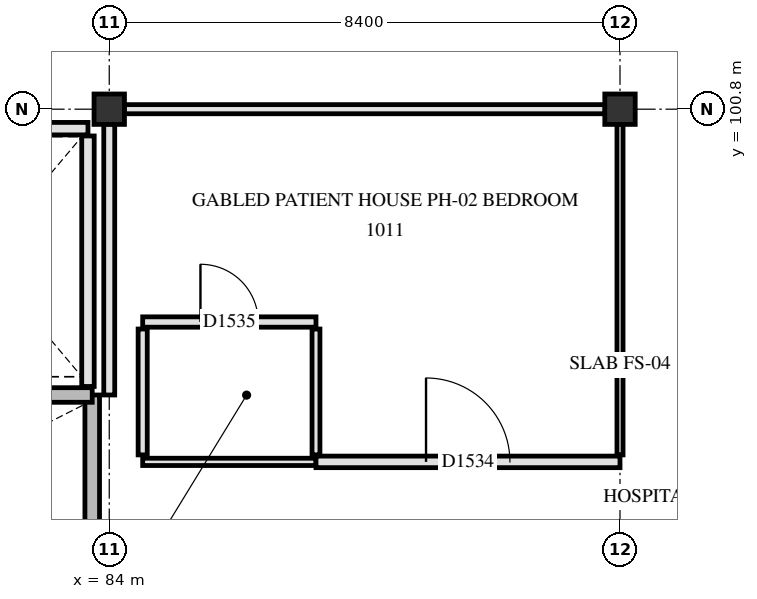
"""IFC4 building model, lengths in metres.
Left out: names, types, materials, properties, quantities, classifications, styles, units other than length and angle.
Written with IfcOpenShell. Run it as: python <this file> out.ifc"""

import sys

from ifc_helpers import new_model, si_unit, direction, frame, frame_2d, origin, origin_2d, place, context, subcontext, project, spatial, rectangle, extrude, element, fill, save


model = new_model("IFC4")
c1 = context("Model", 3, precision=1e-05, world=origin(), true_north=direction((0.0, 1.0)))
c2 = subcontext(c1, "Body", "Model", "MODEL_VIEW")
j1 = project(units=[si_unit("LENGTHUNIT", "METRE"), si_unit("PLANEANGLEUNIT", "RADIAN")], contexts=[c1])
p1 = place(None, origin())
s1 = spatial("IfcSite", under=j1, at=p1, CompositionType="ELEMENT")
p2 = place(p1, origin())
s2 = spatial("IfcBuilding", under=s1, at=p2, CompositionType="ELEMENT")
p3 = place(p2, frame((0.0, 0.0, 30.3)))
s3 = spatial("IfcBuildingStorey", under=s2, at=p3, CompositionType="ELEMENT", Elevation=30.3)
for number, where, z_axis, x_axis in (
    (1, (84.0, 100.8, 0.0), (0.0, 0.0, 1.0), (1.0, 0.0, 0.0)),
    (2, (92.4, 100.8, 0.0), (0.0, 0.0, 1.0), (1.0, 0.0, 0.0)),
):
    element("IfcColumn", number, at=place(p3, frame(where, z_axis=z_axis, x_axis=x_axis)), inside=s3, PredefinedType="COLUMN", context=c2, shape_type="SweptSolid", body=[
        extrude(rectangle(XDim=0.5, YDim=0.5, at=origin_2d()), origin(), (0.0, 0.0, 1.0), 3.9),
    ])
p4 = place(p3, frame((83.72, 92.78, 0.0), z_axis=(0.0, 0.0, 1.0), x_axis=(0.0, 1.0, 0.0)))
e3 = element("IfcWall", 3, at=p4, inside=s3, PredefinedType="SHEAR", context=c2, shape_type="SweptSolid", body=[
    extrude(rectangle(XDim=3.32, YDim=0.24, at=frame_2d((1.66, 0.0))), origin(), (0.0, 0.0, 1.0), 3.66),
])
p5 = place(p3, frame((75.9, 96.1, 0.0), z_axis=(0.0, 0.0, 1.0), x_axis=(1.0, 0.0, 0.0)))
e4 = element("IfcWall", 4, at=p5, inside=s3, PredefinedType="SHEAR", context=c2, shape_type="SweptSolid", body=[
    extrude(rectangle(XDim=7.82, YDim=0.24, at=frame_2d((3.91, 0.0))), origin(), (0.0, 0.0, 1.0), 3.66),
])
p6 = place(p5, frame((0.25, 0.0, 0.0)))
e5 = element("IfcOpeningElement", 5, at=p6, cuts=e4, PredefinedType="OPENING", context=c2, shape_type="SweptSolid", body=[
    extrude(rectangle(XDim=1.45, YDim=2.2, at=frame_2d((0.725, 1.1))), frame((0.0, 0.13, 0.0), z_axis=(0.0, -1.0, 0.0), x_axis=(1.0, 0.0, 0.0)), (0.0, 0.0, 1.0), 0.26),
])
p7 = place(p3, frame((83.65, 96.24, 0.0), z_axis=(0.0, 0.0, 1.0), x_axis=(0.0, 1.0, 0.0)))
e6 = element("IfcWall", 6, at=p7, inside=s3, PredefinedType="PARTITIONING", context=c2, shape_type="SweptSolid", body=[
    extrude(rectangle(XDim=4.12, YDim=0.205, at=frame_2d((2.06, 0.0))), origin(), (0.0, 0.0, 1.0), 3.65),
])
p8 = place(p3, frame((80.08, 100.48, 0.0), z_axis=(0.0, 0.0, 1.0), x_axis=(1.0, 0.0, 0.0)))
e7 = element("IfcWall", 7, at=p8, inside=s3, PredefinedType="PARTITIONING", context=c2, shape_type="SweptSolid", body=[
    extrude(rectangle(XDim=3.57, YDim=0.205, at=frame_2d((1.785, 0.0))), origin(), (0.0, 0.0, 1.0), 3.65),
])
p9 = place(p3, frame((84.55, 95.0, 0.0), z_axis=(0.0, 0.0, 1.0), x_axis=(1.0, 0.0, 0.0)))
e8 = element("IfcWall", 8, at=p9, inside=s3, PredefinedType="PARTITIONING", context=c2, shape_type="SweptSolid", body=[
    extrude(rectangle(XDim=2.85, YDim=0.12, at=frame_2d((1.425, 0.0))), origin(), (0.0, 0.0, 1.0), 3.65),
])
p10 = place(p3, frame((87.4, 95.0, 0.0), z_axis=(0.0, 0.0, 1.0), x_axis=(1.0, 0.0, 0.0)))
e9 = element("IfcWall", 9, at=p10, inside=s3, PredefinedType="PARTITIONING", context=c2, shape_type="SweptSolid", body=[
    extrude(rectangle(XDim=5.0, YDim=0.19, at=frame_2d((2.5, 0.0))), origin(), (0.0, 0.0, 1.0), 3.25),
])
p11 = place(p10, frame((1.81, 0.0, 0.0)))
e10 = element("IfcOpeningElement", 10, at=p11, cuts=e9, PredefinedType="OPENING", context=c2, shape_type="SweptSolid", body=[
    extrude(rectangle(XDim=1.38, YDim=2.22, at=frame_2d((0.69, 1.11))), frame((0.0, 0.105, 0.0), z_axis=(0.0, -1.0, 0.0), x_axis=(1.0, 0.0, 0.0)), (0.0, 0.0, 1.0), 0.21),
])
p12 = place(p3, frame((84.55, 97.3, 0.0), z_axis=(0.0, 0.0, 1.0), x_axis=(1.0, 0.0, 0.0)))
e11 = element("IfcWall", 11, at=p12, inside=s3, PredefinedType="PARTITIONING", context=c2, shape_type="SweptSolid", body=[
    extrude(rectangle(XDim=2.85, YDim=0.17, at=frame_2d((1.425, 0.0))), origin(), (0.0, 0.0, 1.0), 3.65),
])
p13 = place(p12, frame((0.95, 0.0, 0.0)))
e12 = element("IfcOpeningElement", 12, at=p13, cuts=e11, PredefinedType="OPENING", context=c2, shape_type="SweptSolid", body=[
    extrude(rectangle(XDim=0.95, YDim=2.1, at=frame_2d((0.475, 1.05))), frame((0.0, 0.095, 0.0), z_axis=(0.0, -1.0, 0.0), x_axis=(1.0, 0.0, 0.0)), (0.0, 0.0, 1.0), 0.19),
])
p14 = place(p3, frame((84.245, 100.8, 0.0), z_axis=(0.0, 0.0, 1.0), x_axis=(1.0, 0.0, 0.0)))
e13 = element("IfcWall", 13, at=p14, inside=s3, PredefinedType="PARTITIONING", context=c2, shape_type="SweptSolid", body=[
    extrude(rectangle(XDim=7.91, YDim=0.15, at=frame_2d((3.955, 0.0))), origin(), (0.0, 0.0, 1.0), 3.25),
])
p15 = place(p3, frame((84.0, 96.1, 0.0), z_axis=(0.0, 0.0, 1.0), x_axis=(0.0, 1.0, 0.0)))
e14 = element("IfcWall", 14, at=p15, inside=s3, PredefinedType="PARTITIONING", context=c2, shape_type="SweptSolid", body=[
    extrude(rectangle(XDim=4.455, YDim=0.18, at=frame_2d((2.228, 0.0))), origin(), (0.0, 0.0, 1.0), 3.25),
])
p16 = place(p3, frame((84.55, 95.115, 0.0), z_axis=(0.0, 0.0, 1.0), x_axis=(0.0, 1.0, 0.0)))
e15 = element("IfcWall", 15, at=p16, inside=s3, PredefinedType="PARTITIONING", context=c2, shape_type="SweptSolid", body=[
    extrude(rectangle(XDim=2.07, YDim=0.15, at=frame_2d((1.035, 0.0))), origin(), (0.0, 0.0, 1.0), 3.41),
])
p17 = place(p3, frame((87.4, 95.115, 0.0), z_axis=(0.0, 0.0, 1.0), x_axis=(0.0, 1.0, 0.0)))
e16 = element("IfcWall", 16, at=p17, inside=s3, PredefinedType="PARTITIONING", context=c2, shape_type="SweptSolid", body=[
    extrude(rectangle(XDim=2.07, YDim=0.13, at=frame_2d((1.035, 0.0))), origin(), (0.0, 0.0, 1.0), 3.41),
])
p18 = place(p3, frame((92.4, 95.115, 0.0), z_axis=(0.0, 0.0, 1.0), x_axis=(0.0, 1.0, 0.0)))
e17 = element("IfcWall", 17, at=p18, inside=s3, PredefinedType="PARTITIONING", context=c2, shape_type="SweptSolid", body=[
    extrude(rectangle(XDim=5.44, YDim=0.1, at=frame_2d((2.72, 0.0))), origin(), (0.0, 0.0, 1.0), 3.25),
])
p19 = place(p11, origin())
e18 = element("IfcDoor", 18, at=p19, inside=s3, OperationType="SINGLE_SWING_LEFT", PredefinedType="DOOR", context=c2, shape_type="SweptSolid", body=[
    extrude(rectangle(XDim=1.38, YDim=2.22, at=frame_2d((0.69, 1.11))), frame((0.0, 0.025, 0.0), z_axis=(0.0, -1.0, 0.0), x_axis=(1.0, 0.0, 0.0)), (0.0, 0.0, 1.0), 0.05),
])
fill(e10, e18)
p20 = place(p13, origin())
e19 = element("IfcDoor", 19, at=p20, inside=s3, OperationType="SINGLE_SWING_LEFT", PredefinedType="DOOR", context=c2, shape_type="SweptSolid", body=[
    extrude(rectangle(XDim=0.95, YDim=2.1, at=frame_2d((0.475, 1.05))), frame((0.0, 0.025, 0.0), z_axis=(0.0, -1.0, 0.0), x_axis=(1.0, 0.0, 0.0)), (0.0, 0.0, 1.0), 0.05),
])
fill(e12, e19)
save(model, sys.argv[1])
